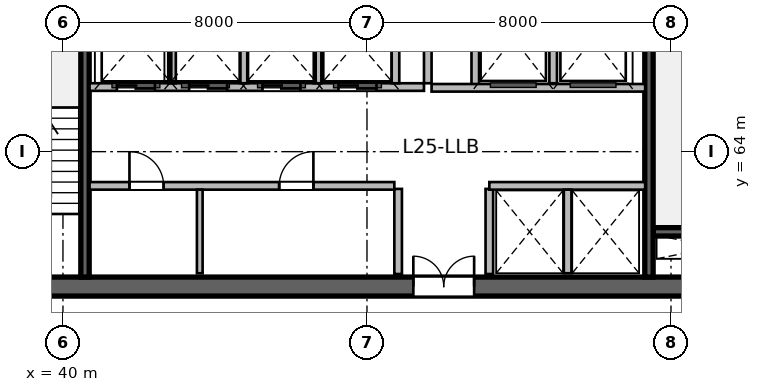
"""IFC4 building model, lengths in metres.
Left out: names, types, materials, properties, quantities, classifications, styles, units other than length and angle.
Written with IfcOpenShell. Run it as: python <this file> out.ifc"""

import sys

from ifc_helpers import new_model, si_unit, direction, frame, frame_2d, origin, place, context, subcontext, project, spatial, rectangle, extrude, source, transform, mapped, element, fill, save


model = new_model("IFC4")
c1 = context("Model", 3, precision=1e-05, world=origin(), true_north=direction((0.0, 1.0)))
c2 = subcontext(c1, "Body", "Model", "MODEL_VIEW")
j1 = project(units=[si_unit("LENGTHUNIT", "METRE"), si_unit("PLANEANGLEUNIT", "RADIAN")], contexts=[c1])
p1 = place(None, origin())
s1 = spatial("IfcSite", under=j1, at=p1, CompositionType="ELEMENT")
p2 = place(p1, origin())
s2 = spatial("IfcBuilding", under=s1, at=p2, CompositionType="ELEMENT")
p3 = place(p2, frame((0.0, 0.0, 107.7)))
s3 = spatial("IfcBuildingStorey", under=s2, at=p3, CompositionType="ELEMENT", Elevation=107.7)
m1 = source(origin(), c2, "Body", "SweptSolid", [
    extrude(rectangle(XDim=21.6, YDim=0.5, at=frame_2d((10.8, 0.0))), origin(), (0.0, 0.0, 1.0), 3.9),
])
p4 = place(p3, frame((37.2, 60.45, 0.0), z_axis=(0.0, 0.0, 1.0), x_axis=(1.0, 0.0, 0.0)))
e1 = element("IfcWall", 1, at=p4, inside=s3, PredefinedType="SHEAR", context=c2, shape_type="MappedRepresentation", body=[
    mapped(m1, transform((0.0, 0.0, 0.0), scale=1.0)),
])
p5 = place(p4, frame((1.1, 0.0, 0.0)))
e2 = element("IfcOpeningElement", 2, at=p5, cuts=e1, PredefinedType="OPENING", context=c2, shape_type="SweptSolid", body=[
    extrude(rectangle(XDim=1.15, YDim=2.15, at=frame_2d((0.575, 1.075))), frame((0.0, 0.26, 0.0), z_axis=(0.0, -1.0, 0.0), x_axis=(1.0, 0.0, 0.0)), (0.0, 0.0, 1.0), 0.52),
])
p6 = place(p4, frame((19.5, 0.0, 0.0)))
e3 = element("IfcOpeningElement", 3, at=p6, cuts=e1, PredefinedType="OPENING", context=c2, shape_type="SweptSolid", body=[
    extrude(rectangle(XDim=0.9, YDim=2.1, at=frame_2d((0.45, 1.05))), frame((0.0, 0.26, 0.0), z_axis=(0.0, -1.0, 0.0), x_axis=(1.0, 0.0, 0.0)), (0.0, 0.0, 1.0), 0.52),
])
p7 = place(p4, frame((12.02, 0.0, 0.0)))
e4 = element("IfcOpeningElement", 4, at=p7, cuts=e1, PredefinedType="OPENING", context=c2, shape_type="SweptSolid", body=[
    extrude(rectangle(XDim=1.6, YDim=2.15, at=frame_2d((0.8, 1.075))), frame((0.0, 0.26, 0.0), z_axis=(0.0, -1.0, 0.0), x_axis=(1.0, 0.0, 0.0)), (0.0, 0.0, 1.0), 0.52),
])
m2 = source(origin(), c2, "Body", "SweptSolid", [
    extrude(rectangle(XDim=3.27, YDim=0.22, at=frame_2d((1.635, 0.0))), origin(), (0.0, 0.0, 1.0), 3.9),
])
p8 = place(p3, frame((55.53, 61.89, 0.0), z_axis=(0.0, 0.0, 1.0), x_axis=(1.0, 0.0, 0.0)))
e5 = element("IfcWall", 5, at=p8, inside=s3, PredefinedType="SHEAR", context=c2, shape_type="MappedRepresentation", body=[
    mapped(m2, transform((0.0, 0.0, 0.0), scale=1.0)),
])
m3 = source(origin(), c2, "Body", "SweptSolid", [
    extrude(rectangle(XDim=11.0, YDim=0.22, at=frame_2d((5.5, 0.0))), origin(), (0.0, 0.0, 1.0), 3.9),
])
p9 = place(p3, frame((40.58, 60.7, 0.0), z_axis=(0.0, 0.0, 1.0), x_axis=(0.0, 1.0, 0.0)))
e6 = element("IfcWall", 6, at=p9, inside=s3, PredefinedType="SHEAR", context=c2, shape_type="MappedRepresentation", body=[
    mapped(m3, transform((0.0, 0.0, 0.0), scale=1.0)),
])
p10 = place(p3, frame((55.42, 60.7, 0.0), z_axis=(0.0, 0.0, 1.0), x_axis=(0.0, 1.0, 0.0)))
e7 = element("IfcWall", 7, at=p10, inside=s3, PredefinedType="SHEAR", context=c2, shape_type="MappedRepresentation", body=[
    mapped(m3, transform((0.0, 0.0, 0.0), scale=1.0)),
])
p11 = place(p10, frame((9.545, 0.0, 0.0)))
e8 = element("IfcOpeningElement", 8, at=p11, cuts=e7, PredefinedType="OPENING", context=c2, shape_type="SweptSolid", body=[
    extrude(rectangle(XDim=1.15, YDim=2.15, at=frame_2d((0.575, 1.075))), frame((0.0, 0.12, 0.0), z_axis=(0.0, -1.0, 0.0), x_axis=(1.0, 0.0, 0.0)), (0.0, 0.0, 1.0), 0.24),
])
m4 = source(origin(), c2, "Body", "SweptSolid", [
    extrude(rectangle(XDim=2.24, YDim=0.2, at=frame_2d((1.12, 0.0))), origin(), (0.0, 0.0, 1.0), 3.65),
])
for number, where, z_axis, x_axis in (
    (9, (48.82, 60.78, 0.0), (0.0, 0.0, 1.0), (0.0, 1.0, 0.0)),
    (10, (51.22, 60.78, 0.0), (0.0, 0.0, 1.0), (0.0, 1.0, 0.0)),
):
    element("IfcWall", number, at=place(p3, frame(where, z_axis=z_axis, x_axis=x_axis)), inside=s3, PredefinedType="SOLIDWALL", context=c2, shape_type="MappedRepresentation", body=[
        mapped(m4, transform((0.0, 0.0, 0.0), scale=1.0)),
    ])
m5 = source(origin(), c2, "Body", "SweptSolid", [
    extrude(rectangle(XDim=5.8, YDim=0.2, at=frame_2d((2.9, 0.0))), origin(), (0.0, 0.0, 1.0), 3.65),
])
p12 = place(p3, frame((49.6, 65.8, 0.0), z_axis=(0.0, 0.0, 1.0), x_axis=(0.0, 1.0, 0.0)))
e11 = element("IfcWall", 11, at=p12, inside=s3, PredefinedType="SOLIDWALL", context=c2, shape_type="MappedRepresentation", body=[
    mapped(m5, transform((0.0, 0.0, 0.0), scale=1.0)),
])
m6 = source(origin(), c2, "Body", "SweptSolid", [
    extrude(rectangle(XDim=2.58, YDim=0.2, at=frame_2d((1.29, 0.0))), origin(), (0.0, 0.0, 1.0), 3.65),
])
p13 = place(p3, frame((50.85, 65.68, 0.0), z_axis=(0.0, 0.0, 1.0), x_axis=(0.0, 1.0, 0.0)))
e12 = element("IfcWall", 12, at=p13, inside=s3, PredefinedType="SOLIDWALL", context=c2, shape_type="MappedRepresentation", body=[
    mapped(m6, transform((0.0, 0.0, 0.0), scale=1.0)),
])
m7 = source(origin(), c2, "Body", "SweptSolid", [
    extrude(rectangle(XDim=2.4, YDim=0.2, at=frame_2d((1.2, 0.0))), origin(), (0.0, 0.0, 1.0), 3.65),
])
p14 = place(p3, frame((52.9, 65.8, 0.0), z_axis=(0.0, 0.0, 1.0), x_axis=(0.0, 1.0, 0.0)))
e13 = element("IfcWall", 13, at=p14, inside=s3, PredefinedType="SOLIDWALL", context=c2, shape_type="MappedRepresentation", body=[
    mapped(m7, transform((0.0, 0.0, 0.0), scale=1.0)),
])
m8 = source(origin(), c2, "Body", "SweptSolid", [
    extrude(rectangle(XDim=5.62, YDim=0.2, at=frame_2d((2.81, 0.0))), origin(), (0.0, 0.0, 1.0), 3.65),
])
p15 = place(p3, frame((49.7, 65.68, 0.0), z_axis=(0.0, 0.0, 1.0), x_axis=(1.0, 0.0, 0.0)))
e14 = element("IfcWall", 14, at=p15, inside=s3, PredefinedType="SOLIDWALL", context=c2, shape_type="MappedRepresentation", body=[
    mapped(m8, transform((0.0, 0.0, 0.0), scale=1.0)),
])
m9 = source(origin(), c2, "Body", "SweptSolid", [
    extrude(rectangle(XDim=8.02, YDim=0.2, at=frame_2d((4.01, 0.0))), origin(), (0.0, 0.0, 1.0), 3.65),
])
p16 = place(p3, frame((40.7, 63.1, 0.0), z_axis=(0.0, 0.0, 1.0), x_axis=(1.0, 0.0, 0.0)))
e15 = element("IfcWall", 15, at=p16, inside=s3, PredefinedType="SOLIDWALL", context=c2, shape_type="MappedRepresentation", body=[
    mapped(m9, transform((0.0, 0.0, 0.0), scale=1.0)),
])
p17 = place(p16, frame((1.05, 0.0, 0.0)))
e16 = element("IfcOpeningElement", 16, at=p17, cuts=e15, PredefinedType="OPENING", context=c2, shape_type="SweptSolid", body=[
    extrude(rectangle(XDim=0.9, YDim=2.1, at=frame_2d((0.45, 1.05))), frame((0.0, 0.11, 0.0), z_axis=(0.0, -1.0, 0.0), x_axis=(1.0, 0.0, 0.0)), (0.0, 0.0, 1.0), 0.22),
])
p18 = place(p16, frame((4.99, 0.0, 0.0)))
e17 = element("IfcOpeningElement", 17, at=p18, cuts=e15, PredefinedType="OPENING", context=c2, shape_type="SweptSolid", body=[
    extrude(rectangle(XDim=0.9, YDim=2.1, at=frame_2d((0.45, 1.05))), frame((0.0, 0.11, 0.0), z_axis=(0.0, -1.0, 0.0), x_axis=(1.0, 0.0, 0.0)), (0.0, 0.0, 1.0), 0.22),
])
m10 = source(origin(), c2, "Body", "SweptSolid", [
    extrude(rectangle(XDim=4.1, YDim=0.2, at=frame_2d((2.05, 0.0))), origin(), (0.0, 0.0, 1.0), 3.65),
])
p19 = place(p3, frame((51.22, 63.1, 0.0), z_axis=(0.0, 0.0, 1.0), x_axis=(1.0, 0.0, 0.0)))
e18 = element("IfcWall", 18, at=p19, inside=s3, PredefinedType="SOLIDWALL", context=c2, shape_type="MappedRepresentation", body=[
    mapped(m10, transform((0.0, 0.0, 0.0), scale=1.0)),
])
m11 = source(origin(), c2, "Body", "SweptSolid", [
    extrude(rectangle(XDim=2.2, YDim=0.15, at=frame_2d((1.1, 0.0))), origin(), (0.0, 0.0, 1.0), 3.65),
])
p20 = place(p3, frame((43.6, 60.8, 0.0), z_axis=(0.0, 0.0, 1.0), x_axis=(0.0, 1.0, 0.0)))
e19 = element("IfcWall", 19, at=p20, inside=s3, PredefinedType="PARTITIONING", context=c2, shape_type="MappedRepresentation", body=[
    mapped(m11, transform((0.0, 0.0, 0.0), scale=1.0)),
])
m12 = source(origin(), c2, "Body", "SweptSolid", [
    extrude(rectangle(XDim=2.2, YDim=0.2, at=frame_2d((1.1, 0.0))), origin(), (0.0, 0.0, 1.0), 3.65),
])
p21 = place(p3, frame((53.28, 60.8, 0.0), z_axis=(0.0, 0.0, 1.0), x_axis=(0.0, 1.0, 0.0)))
e20 = element("IfcWall", 20, at=p21, inside=s3, PredefinedType="SOLIDWALL", context=c2, shape_type="MappedRepresentation", body=[
    mapped(m12, transform((0.0, 0.0, 0.0), scale=1.0)),
])
m13 = source(origin(), c2, "Body", "SweptSolid", [
    extrude(rectangle(XDim=8.8, YDim=0.2, at=frame_2d((4.4, 0.0))), origin(), (0.0, 0.0, 1.0), 3.65),
])
p22 = place(p3, frame((40.7, 65.7, 0.0), z_axis=(0.0, 0.0, 1.0), x_axis=(1.0, 0.0, 0.0)))
e21 = element("IfcWall", 21, at=p22, inside=s3, PredefinedType="SOLIDWALL", context=c2, shape_type="MappedRepresentation", body=[
    mapped(m13, transform((0.0, 0.0, 0.0), scale=1.0)),
])
p23 = place(p22, frame((0.72, 0.0, 0.0)))
e22 = element("IfcOpeningElement", 22, at=p23, cuts=e21, PredefinedType="OPENING", context=c2, shape_type="SweptSolid", body=[
    extrude(rectangle(XDim=1.0, YDim=2.15, at=frame_2d((0.5, 1.075))), frame((0.0, 0.11, 0.0), z_axis=(0.0, -1.0, 0.0), x_axis=(1.0, 0.0, 0.0)), (0.0, 0.0, 1.0), 0.22),
])
p24 = place(p22, frame((2.62, 0.0, 0.0)))
e23 = element("IfcOpeningElement", 23, at=p24, cuts=e21, PredefinedType="OPENING", context=c2, shape_type="SweptSolid", body=[
    extrude(rectangle(XDim=1.0, YDim=2.15, at=frame_2d((0.5, 1.075))), frame((0.0, 0.11, 0.0), z_axis=(0.0, -1.0, 0.0), x_axis=(1.0, 0.0, 0.0)), (0.0, 0.0, 1.0), 0.22),
])
p25 = place(p22, frame((4.55, 0.0, 0.0)))
e24 = element("IfcOpeningElement", 24, at=p25, cuts=e21, PredefinedType="OPENING", context=c2, shape_type="SweptSolid", body=[
    extrude(rectangle(XDim=1.0, YDim=2.15, at=frame_2d((0.5, 1.075))), frame((0.0, 0.11, 0.0), z_axis=(0.0, -1.0, 0.0), x_axis=(1.0, 0.0, 0.0)), (0.0, 0.0, 1.0), 0.22),
])
p26 = place(p22, frame((6.55, 0.0, 0.0)))
e25 = element("IfcOpeningElement", 25, at=p26, cuts=e21, PredefinedType="OPENING", context=c2, shape_type="SweptSolid", body=[
    extrude(rectangle(XDim=1.0, YDim=2.15, at=frame_2d((0.5, 1.075))), frame((0.0, 0.11, 0.0), z_axis=(0.0, -1.0, 0.0), x_axis=(1.0, 0.0, 0.0)), (0.0, 0.0, 1.0), 0.22),
])
for number, where, z_axis, x_axis in (
    (26, (48.75, 65.8, 0.0), (0.0, 0.0, 1.0), (0.0, 1.0, 0.0)),
    (27, (42.87, 65.8, 0.0), (0.0, 0.0, 1.0), (0.0, 1.0, 0.0)),
    (28, (44.77, 65.8, 0.0), (0.0, 0.0, 1.0), (0.0, 1.0, 0.0)),
    (29, (46.7, 65.8, 0.0), (0.0, 0.0, 1.0), (0.0, 1.0, 0.0)),
):
    element("IfcWall", number, at=place(p3, frame(where, z_axis=z_axis, x_axis=x_axis)), inside=s3, PredefinedType="SOLIDWALL", context=c2, shape_type="MappedRepresentation", body=[
        mapped(m7, transform((0.0, 0.0, 0.0), scale=1.0)),
    ])
m14 = source(origin(), c2, "Body", "SweptSolid", [
    extrude(rectangle(XDim=1.6, YDim=2.15, at=frame_2d((0.8, 1.075))), frame((0.0, 0.025, 0.0), z_axis=(0.0, -1.0, 0.0), x_axis=(1.0, 0.0, 0.0)), (0.0, 0.0, 1.0), 0.05),
])
p27 = place(p7, origin())
e30 = element("IfcDoor", 30, at=p27, inside=s3, OperationType="DOUBLE_DOOR_SINGLE_SWING", PredefinedType="DOOR", context=c2, shape_type="MappedRepresentation", body=[
    mapped(m14, transform((0.0, 0.0, 0.0), scale=1.0)),
])
fill(e4, e30)
m15 = source(origin(), c2, "Body", "SweptSolid", [
    extrude(rectangle(XDim=0.9, YDim=2.1, at=frame_2d((0.45, 1.05))), frame((0.0, 0.025, 0.0), z_axis=(0.0, -1.0, 0.0), x_axis=(1.0, 0.0, 0.0)), (0.0, 0.0, 1.0), 0.05),
])
p28 = place(p17, origin())
e31 = element("IfcDoor", 31, at=p28, inside=s3, OperationType="SINGLE_SWING_LEFT", PredefinedType="DOOR", context=c2, shape_type="MappedRepresentation", body=[
    mapped(m15, transform((0.0, 0.0, 0.0), scale=1.0)),
])
fill(e16, e31)
p29 = place(p18, origin())
e32 = element("IfcDoor", 32, at=p29, inside=s3, OperationType="SINGLE_SWING_RIGHT", PredefinedType="DOOR", context=c2, shape_type="MappedRepresentation", body=[
    mapped(m15, transform((0.0, 0.0, 0.0), scale=1.0)),
])
fill(e17, e32)
m16 = source(origin(), c2, "Body", "SweptSolid", [
    extrude(rectangle(XDim=1.0, YDim=2.15, at=frame_2d((0.5, 1.075))), frame((0.0, 0.025, 0.0), z_axis=(0.0, -1.0, 0.0), x_axis=(1.0, 0.0, 0.0)), (0.0, 0.0, 1.0), 0.05),
])
p30 = place(p23, origin())
e33 = element("IfcDoor", 33, at=p30, inside=s3, OperationType="DOUBLE_DOOR_SLIDING", PredefinedType="DOOR", context=c2, shape_type="MappedRepresentation", body=[
    mapped(m16, transform((0.0, 0.0, 0.0), scale=1.0)),
])
fill(e22, e33)
p31 = place(p24, origin())
e34 = element("IfcDoor", 34, at=p31, inside=s3, OperationType="DOUBLE_DOOR_SLIDING", PredefinedType="DOOR", context=c2, shape_type="MappedRepresentation", body=[
    mapped(m16, transform((0.0, 0.0, 0.0), scale=1.0)),
])
fill(e23, e34)
p32 = place(p25, origin())
e35 = element("IfcDoor", 35, at=p32, inside=s3, OperationType="DOUBLE_DOOR_SLIDING", PredefinedType="DOOR", context=c2, shape_type="MappedRepresentation", body=[
    mapped(m16, transform((0.0, 0.0, 0.0), scale=1.0)),
])
fill(e24, e35)
p33 = place(p26, origin())
e36 = element("IfcDoor", 36, at=p33, inside=s3, OperationType="DOUBLE_DOOR_SLIDING", PredefinedType="DOOR", context=c2, shape_type="MappedRepresentation", body=[
    mapped(m16, transform((0.0, 0.0, 0.0), scale=1.0)),
])
fill(e25, e36)
save(model, sys.argv[1])
